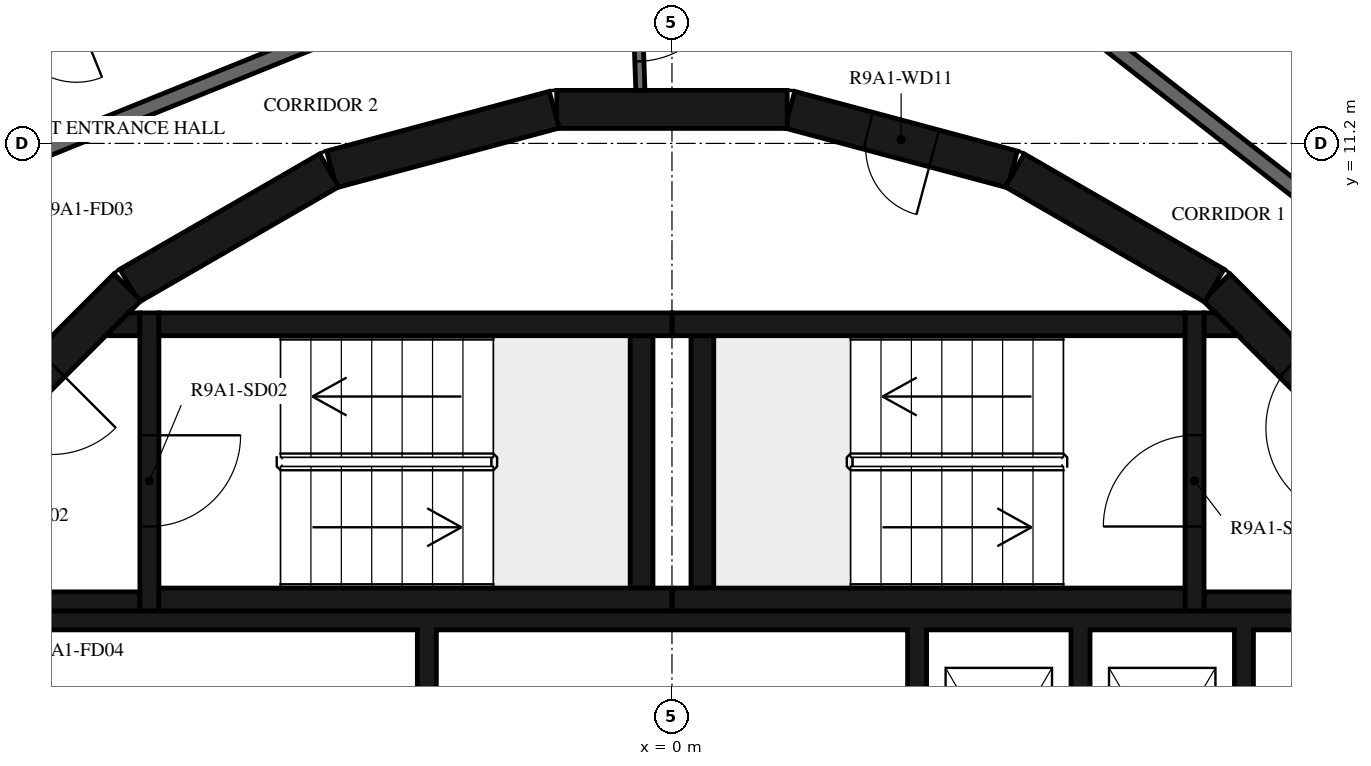
"""IFC4 building model, lengths in metres.
Left out: names, types, materials, properties, quantities, classifications, styles, units other than length and angle.
Written with IfcOpenShell. Run it as: python <this file> out.ifc"""

import sys

from ifc_helpers import new_model, si_unit, direction, frame, frame_2d, origin, place, context, subcontext, project, spatial, polyline, rectangle, outline, extrude, element, fill, save


model = new_model("IFC4")
c1 = context("Model", 3, precision=1e-05, world=origin(), true_north=direction((0.0, 1.0)))
c2 = subcontext(c1, "Body", "Model", "MODEL_VIEW")
j1 = project(units=[si_unit("LENGTHUNIT", "METRE"), si_unit("PLANEANGLEUNIT", "RADIAN")], contexts=[c1])
p1 = place(None, origin())
s1 = spatial("IfcSite", under=j1, at=p1, CompositionType="ELEMENT")
p2 = place(p1, origin())
s2 = spatial("IfcBuilding", under=s1, at=p2, CompositionType="ELEMENT")
p3 = place(p2, frame((0.0, 0.0, 336.5)))
s3 = spatial("IfcBuildingStorey", under=s2, at=p3, CompositionType="ELEMENT", Elevation=336.5)
p4 = place(p3, frame((9.308, 7.164, 0.0), z_axis=(0.0, 0.0, 1.0), x_axis=(-0.707106781187, 0.707106781187, 0.0)))
e1 = element("IfcWall", 1, at=p4, inside=s3, PredefinedType="SHEAR", context=c2, shape_type="SweptSolid", body=[
    extrude(rectangle(XDim=3.032, YDim=0.5, at=frame_2d((1.516, 0.0))), origin(), (0.0, 0.0, 1.0), 3.12),
])
p5 = place(p4, frame((0.416, 0.0, 0.0)))
e2 = element("IfcOpeningElement", 2, at=p5, cuts=e1, PredefinedType="OPENING", context=c2, shape_type="SweptSolid", body=[
    extrude(rectangle(XDim=1.2, YDim=2.1, at=frame_2d((0.6, 1.05))), frame((0.0, 0.26, 0.0), z_axis=(0.0, -1.0, 0.0), x_axis=(1.0, 0.0, 0.0)), (0.0, 0.0, 1.0), 0.52),
])
p6 = place(p3, frame((7.137, 9.329, 0.0), z_axis=(0.0, 0.0, 1.0), x_axis=(-0.865975092491, 0.500087131594, 0.0)))
e3 = element("IfcWall", 3, at=p6, inside=s3, PredefinedType="SHEAR", context=c2, shape_type="SweptSolid", body=[
    extrude(rectangle(XDim=3.033, YDim=0.5, at=frame_2d((1.516, 0.0))), origin(), (0.0, 0.0, 1.0), 3.12),
])
p7 = place(p3, frame((4.479, 10.858, 0.0), z_axis=(0.0, 0.0, 1.0), x_axis=(-0.965948410781, 0.258734743916, 0.0)))
e4 = element("IfcWall", 4, at=p7, inside=s3, PredefinedType="SHEAR", context=c2, shape_type="SweptSolid", body=[
    extrude(rectangle(XDim=3.033, YDim=0.5, at=frame_2d((1.516, 0.0))), origin(), (0.0, 0.0, 1.0), 3.12),
])
p8 = place(p7, frame((1.066, 0.0, 0.0)))
e5 = element("IfcOpeningElement", 5, at=p8, cuts=e4, PredefinedType="OPENING", context=c2, shape_type="SweptSolid", body=[
    extrude(rectangle(XDim=0.9, YDim=2.1, at=frame_2d((0.45, 1.05))), frame((0.0, 0.26, 0.0), z_axis=(0.0, -1.0, 0.0), x_axis=(1.0, 0.0, 0.0)), (0.0, 0.0, 1.0), 0.52),
])
for number, where, z_axis, x_axis in (
    (6, (1.516, 11.647, 0.0), (0.0, 0.0, 1.0), (-1.0, 0.0, 0.0)),
    (7, (-1.55, 11.643, 0.0), (0.0, 0.0, 1.0), (-0.966, -0.259, 0.0)),
    (8, (-4.51, 10.845, 0.0), (0.0, 0.0, 1.0), (-0.866, -0.5, 0.0)),
):
    element("IfcWall", number, at=place(p3, frame(where, z_axis=z_axis, x_axis=x_axis)), inside=s3, PredefinedType="SHEAR", context=c2, shape_type="SweptSolid", body=[
        extrude(rectangle(XDim=3.033, YDim=0.5, at=frame_2d((1.516, 0.0))), origin(), (0.0, 0.0, 1.0), 3.12),
    ])
p9 = place(p3, frame((-7.164, 9.308, 0.0), z_axis=(0.0, 0.0, 1.0), x_axis=(-0.707106781187, -0.707106781187, 0.0)))
e9 = element("IfcWall", 9, at=p9, inside=s3, PredefinedType="SHEAR", context=c2, shape_type="SweptSolid", body=[
    extrude(rectangle(XDim=3.032, YDim=0.5, at=frame_2d((1.516, 0.0))), origin(), (0.0, 0.0, 1.0), 3.12),
])
p10 = place(p9, frame((1.416, 0.0, 0.0)))
e10 = element("IfcOpeningElement", 10, at=p10, cuts=e9, PredefinedType="OPENING", context=c2, shape_type="SweptSolid", body=[
    extrude(rectangle(XDim=1.2, YDim=2.1, at=frame_2d((0.6, 1.05))), frame((0.0, 0.26, 0.0), z_axis=(0.0, -1.0, 0.0), x_axis=(1.0, 0.0, 0.0)), (0.0, 0.0, 1.0), 0.52),
])
for number, where, z_axis, x_axis in (
    (11, (0.0, 5.2, 0.0), (0.0, 0.0, 1.0), (1.0, 0.0, 0.0)),
    (12, (0.0, 8.82, 0.0), (0.0, 0.0, 1.0), (1.0, 0.0, 0.0)),
):
    element("IfcWall", number, at=place(p3, frame(where, z_axis=z_axis, x_axis=x_axis)), inside=s3, PredefinedType="SHEAR", context=c2, shape_type="SweptSolid", body=[
        extrude(rectangle(XDim=6.75, YDim=0.3, at=frame_2d((3.375, 0.0))), origin(), (0.0, 0.0, 1.0), 3.12),
    ])
p11 = place(p3, frame((0.4, 5.35, 0.0), z_axis=(0.0, 0.0, 1.0), x_axis=(0.0, 1.0, 0.0)))
e13 = element("IfcWall", 13, at=p11, inside=s3, PredefinedType="SHEAR", context=c2, shape_type="SweptSolid", body=[
    extrude(rectangle(XDim=3.32, YDim=0.3, at=frame_2d((1.66, 0.0))), origin(), (0.0, 0.0, 1.0), 3.12),
])
p12 = place(p3, frame((6.875, 5.05, 0.0), z_axis=(0.0, 0.0, 1.0), x_axis=(0.0, 1.0, 0.0)))
e14 = element("IfcWall", 14, at=p12, inside=s3, PredefinedType="SHEAR", context=c2, shape_type="SweptSolid", body=[
    extrude(rectangle(XDim=3.92, YDim=0.25, at=frame_2d((1.96, 0.0))), origin(), (0.0, 0.0, 1.0), 3.12),
])
p13 = place(p12, frame((1.11, 0.0, 0.0)))
e15 = element("IfcOpeningElement", 15, at=p13, cuts=e14, PredefinedType="OPENING", context=c2, shape_type="SweptSolid", body=[
    extrude(rectangle(XDim=1.2, YDim=2.1, at=frame_2d((0.6, 1.05))), frame((0.0, 0.135, 0.0), z_axis=(0.0, -1.0, 0.0), x_axis=(1.0, 0.0, 0.0)), (0.0, 0.0, 1.0), 0.27),
])
p14 = place(p3, frame((7.0, 5.175, 0.0), z_axis=(0.0, 0.0, 1.0), x_axis=(1.0, 0.0, 0.0)))
e16 = element("IfcWall", 16, at=p14, inside=s3, PredefinedType="SHEAR", context=c2, shape_type="SweptSolid", body=[
    extrude(rectangle(XDim=3.1, YDim=0.25, at=frame_2d((1.55, 0.0))), origin(), (0.0, 0.0, 1.0), 3.12),
])
p15 = place(p3, origin())
e17 = element("IfcWall", 17, at=p15, inside=s3, PredefinedType="SHEAR", context=c2, shape_type="SweptSolid", body=[
    extrude(outline(polyline([(7.448, 8.67), (7.0, 8.67), (7.0, 8.97), (7.148, 8.97), (7.448, 8.67)])), origin(), (0.0, 0.0, 1.0), 3.12),
])
for number, where, z_axis, x_axis in (
    (18, (-6.75, 5.2, 0.0), (0.0, 0.0, 1.0), (1.0, 0.0, 0.0)),
    (19, (-6.75, 8.82, 0.0), (0.0, 0.0, 1.0), (1.0, 0.0, 0.0)),
):
    element("IfcWall", number, at=place(p3, frame(where, z_axis=z_axis, x_axis=x_axis)), inside=s3, PredefinedType="SHEAR", context=c2, shape_type="SweptSolid", body=[
        extrude(rectangle(XDim=6.75, YDim=0.3, at=frame_2d((3.375, 0.0))), origin(), (0.0, 0.0, 1.0), 3.12),
    ])
p16 = place(p3, frame((-0.4, 5.35, 0.0), z_axis=(0.0, 0.0, 1.0), x_axis=(0.0, 1.0, 0.0)))
e20 = element("IfcWall", 20, at=p16, inside=s3, PredefinedType="SHEAR", context=c2, shape_type="SweptSolid", body=[
    extrude(rectangle(XDim=3.32, YDim=0.3, at=frame_2d((1.66, 0.0))), origin(), (0.0, 0.0, 1.0), 3.12),
])
p17 = place(p3, frame((-6.875, 8.97, 0.0), z_axis=(0.0, 0.0, 1.0), x_axis=(0.0, -1.0, 0.0)))
e21 = element("IfcWall", 21, at=p17, inside=s3, PredefinedType="SHEAR", context=c2, shape_type="SweptSolid", body=[
    extrude(rectangle(XDim=3.92, YDim=0.25, at=frame_2d((1.96, 0.0))), origin(), (0.0, 0.0, 1.0), 3.12),
])
p18 = place(p17, frame((1.61, 0.0, 0.0)))
e22 = element("IfcOpeningElement", 22, at=p18, cuts=e21, PredefinedType="OPENING", context=c2, shape_type="SweptSolid", body=[
    extrude(rectangle(XDim=1.2, YDim=2.1, at=frame_2d((0.6, 1.05))), frame((0.0, 0.135, 0.0), z_axis=(0.0, -1.0, 0.0), x_axis=(1.0, 0.0, 0.0)), (0.0, 0.0, 1.0), 0.27),
])
p19 = place(p3, frame((-7.0, 5.175, 0.0), z_axis=(0.0, 0.0, 1.0), x_axis=(-1.0, 0.0, 0.0)))
e23 = element("IfcWall", 23, at=p19, inside=s3, PredefinedType="SHEAR", context=c2, shape_type="SweptSolid", body=[
    extrude(rectangle(XDim=3.1, YDim=0.25, at=frame_2d((1.55, 0.0))), origin(), (0.0, 0.0, 1.0), 3.12),
])
p20 = place(p3, origin())
e24 = element("IfcWall", 24, at=p20, inside=s3, PredefinedType="SHEAR", context=c2, shape_type="SweptSolid", body=[
    extrude(outline(polyline([(-7.148, 8.97), (-7.0, 8.97), (-7.0, 8.67), (-7.448, 8.67), (-7.148, 8.97)])), origin(), (0.0, 0.0, 1.0), 3.12),
])
p21 = place(p3, origin())
e25 = element("IfcWall", 25, at=p21, inside=s3, PredefinedType="SHEAR", context=c2, shape_type="SweptSolid", body=[
    extrude(outline(polyline([(-9.8, 1.9), (-9.55, 1.9), (-9.55, 4.8), (-3.35, 4.8), (-3.35, 1.9), (-3.1, 1.9), (-3.1, 4.8), (3.1, 4.8), (3.1, 1.9), (3.35, 1.9), (3.35, 4.8), (5.25, 4.8), (5.25, 1.9), (5.5, 1.9), (5.5, 4.8), (7.4, 4.8), (7.4, 1.9), (7.65, 1.9), (7.65, 4.8), (9.55, 4.8), (9.55, 1.9), (9.8, 1.9), (9.8, 4.8), (9.8, 5.05), (-9.8, 5.05), (-9.8, 4.8), (-9.8, 1.9)])), origin(), (0.0, 0.0, 1.0), 3.12),
])
p22 = place(p3, frame((-0.475, 13.598, 0.0), z_axis=(0.0, 0.0, 1.0), x_axis=(0.034852521429, -0.999392466326, 0.0)))
e26 = element("IfcWall", 26, at=p22, inside=s3, PredefinedType="PARTITIONING", context=c2, shape_type="SweptSolid", body=[
    extrude(rectangle(XDim=1.702, YDim=0.12, at=frame_2d((0.851, 0.0))), origin(), (0.0, 0.0, 1.0), 3.12),
])
p23 = place(p22, frame((0.12, 0.0, 0.0)))
e27 = element("IfcOpeningElement", 27, at=p23, cuts=e26, PredefinedType="OPENING", context=c2, shape_type="SweptSolid", body=[
    extrude(rectangle(XDim=1.2, YDim=2.1, at=frame_2d((0.6, 1.05))), frame((0.0, 0.07, 0.0), z_axis=(0.0, -1.0, 0.0), x_axis=(1.0, 0.0, 0.0)), (0.0, 0.0, 1.0), 0.14),
])
p24 = place(p3, frame((11.079, 8.349, 0.0), z_axis=(0.0, 0.0, 1.0), x_axis=(-0.78800478687, 0.615669112324, 0.0)))
e28 = element("IfcWall", 28, at=p24, inside=s3, PredefinedType="STANDARD", context=c2, shape_type="SweptSolid", body=[
    extrude(rectangle(XDim=7.181, YDim=0.2, at=frame_2d((3.591, 0.0))), origin(), (0.0, 0.0, 1.0), 3.12),
])
p25 = place(p24, frame((1.0, 0.0, 0.0)))
e29 = element("IfcOpeningElement", 29, at=p25, cuts=e28, PredefinedType="OPENING", context=c2, shape_type="SweptSolid", body=[
    extrude(rectangle(XDim=1.0, YDim=2.1, at=frame_2d((0.5, 1.05))), frame((0.0, 0.11, 0.0), z_axis=(0.0, -1.0, 0.0), x_axis=(1.0, 0.0, 0.0)), (0.0, 0.0, 1.0), 0.22),
])
p26 = place(p3, frame((-1.691, 13.769, 0.0), z_axis=(0.0, 0.0, 1.0), x_axis=(-0.92717916932, -0.374618189599, 0.0)))
e30 = element("IfcWall", 30, at=p26, inside=s3, PredefinedType="STANDARD", context=c2, shape_type="SweptSolid", body=[
    extrude(rectangle(XDim=7.181, YDim=0.2, at=frame_2d((3.591, 0.0))), origin(), (0.0, 0.0, 1.0), 3.12),
])
p27 = place(p3, frame((12.319, 9.283, 0.0), z_axis=(0.0, 0.0, 1.0), x_axis=(-0.788000268464, 0.61567489546, 0.0)))
e31 = element("IfcWall", 31, at=p27, inside=s3, PredefinedType="PARTITIONING", context=c2, shape_type="SweptSolid", body=[
    extrude(rectangle(XDim=7.985, YDim=0.12, at=frame_2d((3.992, 0.0))), origin(), (0.0, 0.0, 1.0), 3.12),
])
p28 = place(p27, frame((0.2, 0.0, 0.0)))
e32 = element("IfcOpeningElement", 32, at=p28, cuts=e31, PredefinedType="OPENING", context=c2, shape_type="SweptSolid", body=[
    extrude(rectangle(XDim=0.9, YDim=2.1, at=frame_2d((0.45, 1.05))), frame((0.0, 0.07, 0.0), z_axis=(0.0, -1.0, 0.0), x_axis=(1.0, 0.0, 0.0)), (0.0, 0.0, 1.0), 0.14),
])
p29 = place(p3, frame((-1.88, 15.311, 0.0), z_axis=(0.0, 0.0, 1.0), x_axis=(-0.927184866592, -0.374604088557, 0.0)))
e33 = element("IfcWall", 33, at=p29, inside=s3, PredefinedType="PARTITIONING", context=c2, shape_type="SweptSolid", body=[
    extrude(rectangle(XDim=7.985, YDim=0.12, at=frame_2d((3.993, 0.0))), origin(), (0.0, 0.0, 1.0), 3.12),
])
p30 = place(p29, frame((3.262, 0.0, 0.0)))
e34 = element("IfcOpeningElement", 34, at=p30, cuts=e33, PredefinedType="OPENING", context=c2, shape_type="SweptSolid", body=[
    extrude(rectangle(XDim=0.9, YDim=2.1, at=frame_2d((0.45, 1.05))), frame((0.0, 0.07, 0.0), z_axis=(0.0, -1.0, 0.0), x_axis=(1.0, 0.0, 0.0)), (0.0, 0.0, 1.0), 0.14),
])
p31 = place(p29, frame((6.423, 0.0, 0.0)))
e35 = element("IfcOpeningElement", 35, at=p31, cuts=e33, PredefinedType="OPENING", context=c2, shape_type="SweptSolid", body=[
    extrude(rectangle(XDim=0.9, YDim=2.1, at=frame_2d((0.45, 1.05))), frame((0.0, 0.07, 0.0), z_axis=(0.0, -1.0, 0.0), x_axis=(1.0, 0.0, 0.0)), (0.0, 0.0, 1.0), 0.14),
])
p32 = place(p13, origin())
e36 = element("IfcDoor", 36, at=p32, inside=s3, OperationType="SINGLE_SWING_LEFT", PredefinedType="DOOR", context=c2, shape_type="SweptSolid", body=[
    extrude(rectangle(XDim=1.2, YDim=2.1, at=frame_2d((0.6, 1.05))), frame((0.0, 0.025, 0.0), z_axis=(0.0, -1.0, 0.0), x_axis=(1.0, 0.0, 0.0)), (0.0, 0.0, 1.0), 0.05),
])
fill(e15, e36)
p33 = place(p5, origin())
e37 = element("IfcDoor", 37, at=p33, inside=s3, OperationType="SINGLE_SWING_RIGHT", PredefinedType="DOOR", context=c2, shape_type="SweptSolid", body=[
    extrude(rectangle(XDim=1.2, YDim=2.1, at=frame_2d((0.6, 1.05))), frame((0.0, 0.025, 0.0), z_axis=(0.0, -1.0, 0.0), x_axis=(1.0, 0.0, 0.0)), (0.0, 0.0, 1.0), 0.05),
])
fill(e2, e37)
p34 = place(p18, origin())
e38 = element("IfcDoor", 38, at=p34, inside=s3, OperationType="SINGLE_SWING_LEFT", PredefinedType="DOOR", context=c2, shape_type="SweptSolid", body=[
    extrude(rectangle(XDim=1.2, YDim=2.1, at=frame_2d((0.6, 1.05))), frame((0.0, 0.025, 0.0), z_axis=(0.0, -1.0, 0.0), x_axis=(1.0, 0.0, 0.0)), (0.0, 0.0, 1.0), 0.05),
])
fill(e22, e38)
p35 = place(p10, origin())
e39 = element("IfcDoor", 39, at=p35, inside=s3, OperationType="SINGLE_SWING_RIGHT", PredefinedType="DOOR", context=c2, shape_type="SweptSolid", body=[
    extrude(rectangle(XDim=1.2, YDim=2.1, at=frame_2d((0.6, 1.05))), frame((0.0, 0.025, 0.0), z_axis=(0.0, -1.0, 0.0), x_axis=(1.0, 0.0, 0.0)), (0.0, 0.0, 1.0), 0.05),
])
fill(e10, e39)
p36 = place(p8, origin())
e40 = element("IfcDoor", 40, at=p36, inside=s3, OperationType="SINGLE_SWING_LEFT", PredefinedType="DOOR", context=c2, shape_type="SweptSolid", body=[
    extrude(rectangle(XDim=0.9, YDim=2.1, at=frame_2d((0.45, 1.05))), frame((0.0, 0.025, 0.0), z_axis=(0.0, -1.0, 0.0), x_axis=(1.0, 0.0, 0.0)), (0.0, 0.0, 1.0), 0.05),
])
fill(e5, e40)
p37 = place(p23, origin())
e41 = element("IfcDoor", 41, at=p37, inside=s3, OperationType="DOUBLE_DOOR_SINGLE_SWING", PredefinedType="DOOR", context=c2, shape_type="SweptSolid", body=[
    extrude(rectangle(XDim=1.2, YDim=2.1, at=frame_2d((0.6, 1.05))), frame((0.0, 0.025, 0.0), z_axis=(0.0, -1.0, 0.0), x_axis=(1.0, 0.0, 0.0)), (0.0, 0.0, 1.0), 0.05),
])
fill(e27, e41)
save(model, sys.argv[1])
